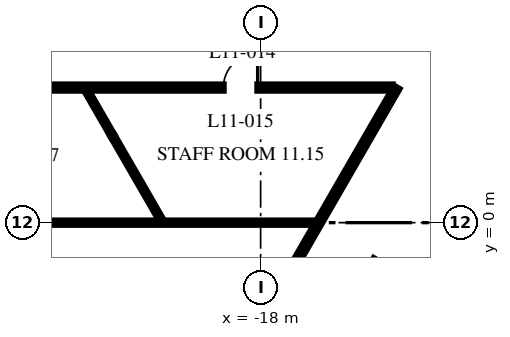
"""IFC4 building model, lengths in metres.
Left out: names, types, materials, properties, quantities, classifications, styles, units other than length and angle.
Written with IfcOpenShell. Run it as: python <this file> out.ifc"""

import sys

from ifc_helpers import new_model, si_unit, direction, frame, frame_2d, origin, place, context, subcontext, project, spatial, rectangle, extrude, element, fill, save


model = new_model("IFC4")
c1 = context("Model", 3, precision=1e-05, world=origin(), true_north=direction((0.0, 1.0)))
c2 = subcontext(c1, "Body", "Model", "MODEL_VIEW")
j1 = project(units=[si_unit("LENGTHUNIT", "METRE"), si_unit("PLANEANGLEUNIT", "RADIAN")], contexts=[c1])
p1 = place(None, origin())
s1 = spatial("IfcSite", under=j1, at=p1, CompositionType="ELEMENT")
p2 = place(p1, origin())
s2 = spatial("IfcBuilding", under=s1, at=p2, CompositionType="ELEMENT")
p3 = place(p2, frame((0.0, 0.0, 50.4)))
s3 = spatial("IfcBuildingStorey", under=s2, at=p3, CompositionType="ELEMENT", Elevation=50.4)
p4 = place(p3, frame((-22.584, 3.477, 0.0), z_axis=(0.0, 0.0, 1.0), x_axis=(0.499978698016, -0.866037702141, 0.0)))
e1 = element("IfcWall", 1, at=p4, inside=s3, PredefinedType="PARTITIONING", context=c2, shape_type="SweptSolid", body=[
    extrude(rectangle(XDim=1.375, YDim=0.1, at=frame_2d((0.687, 0.0))), origin(), (0.0, 0.0, 1.0), 3.438),
])
p5 = place(p3, frame((-21.897, 2.287, 0.0), z_axis=(0.0, 0.0, 1.0), x_axis=(0.499995433041, -0.866028040503, 0.0)))
e2 = element("IfcWall", 2, at=p5, inside=s3, PredefinedType="PARTITIONING", context=c2, shape_type="SweptSolid", body=[
    extrude(rectangle(XDim=2.581, YDim=0.1, at=frame_2d((1.29, 0.0))), origin(), (0.0, 0.0, 1.0), 4.05),
])
p6 = place(p3, frame((-24.618, 0.0, 0.0), z_axis=(0.0, 0.0, 1.0), x_axis=(1.0, 0.0, 0.0)))
e3 = element("IfcWall", 3, at=p6, inside=s3, PredefinedType="PARTITIONING", context=c2, shape_type="SweptSolid", body=[
    extrude(rectangle(XDim=8.056, YDim=0.1, at=frame_2d((4.028, 0.0))), origin(), (0.0, 0.0, 1.0), 4.05),
])
p7 = place(p3, frame((-30.77, 3.555, 0.0), z_axis=(0.0, 0.0, 1.0), x_axis=(1.0, 0.0, 0.0)))
e4 = element("IfcWall", 4, at=p7, inside=s3, PredefinedType="PARTITIONING", context=c2, shape_type="SweptSolid", body=[
    extrude(rectangle(XDim=16.24, YDim=0.15, at=frame_2d((8.12, 0.0))), origin(), (0.0, 0.0, 1.0), 4.05),
])
p8 = place(p7, frame((11.791, 0.0, 0.0)))
e5 = element("IfcOpeningElement", 5, at=p8, cuts=e4, PredefinedType="OPENING", context=c2, shape_type="SweptSolid", body=[
    extrude(rectangle(XDim=0.9, YDim=2.1, at=frame_2d((0.45, 1.05))), frame((0.0, 0.085, 0.0), z_axis=(0.0, -1.0, 0.0), x_axis=(1.0, 0.0, 0.0)), (0.0, 0.0, 1.0), 0.17),
])
p9 = place(p7, frame((3.644, 0.0, 0.0)))
e6 = element("IfcOpeningElement", 6, at=p9, cuts=e4, PredefinedType="OPENING", context=c2, shape_type="SweptSolid", body=[
    extrude(rectangle(XDim=0.9, YDim=2.1, at=frame_2d((0.45, 1.05))), frame((0.0, 0.085, 0.0), z_axis=(0.0, -1.0, 0.0), x_axis=(1.0, 0.0, 0.0)), (0.0, 0.0, 1.0), 0.17),
])
p10 = place(p3, frame((-24.04, -13.108, 0.0), z_axis=(0.0, 0.0, 1.0), x_axis=(0.500008033299, 0.866020765707, 0.0)))
e7 = element("IfcWall", 7, at=p10, inside=s3, PredefinedType="PARTITIONING", context=c2, shape_type="SweptSolid", body=[
    extrude(rectangle(XDim=19.24, YDim=0.15, at=frame_2d((9.62, 0.0))), origin(), (0.0, 0.0, 1.0), 4.05),
])
p11 = place(p10, frame((4.852, 0.0, 0.0)))
e8 = element("IfcOpeningElement", 8, at=p11, cuts=e7, PredefinedType="OPENING", context=c2, shape_type="SweptSolid", body=[
    extrude(rectangle(XDim=0.9, YDim=2.1, at=frame_2d((0.45, 1.05))), frame((0.0, 0.085, 0.0), z_axis=(0.0, -1.0, 0.0), x_axis=(1.0, 0.0, 0.0)), (0.0, 0.0, 1.0), 0.17),
])
p12 = place(p8, origin())
e9 = element("IfcDoor", 9, at=p12, inside=s3, OperationType="SINGLE_SWING_LEFT", PredefinedType="DOOR", context=c2, shape_type="SweptSolid", body=[
    extrude(rectangle(XDim=0.9, YDim=2.1, at=frame_2d((0.45, 1.05))), frame((0.0, 0.025, 0.0), z_axis=(0.0, -1.0, 0.0), x_axis=(1.0, 0.0, 0.0)), (0.0, 0.0, 1.0), 0.05),
])
fill(e5, e9)
save(model, sys.argv[1])
